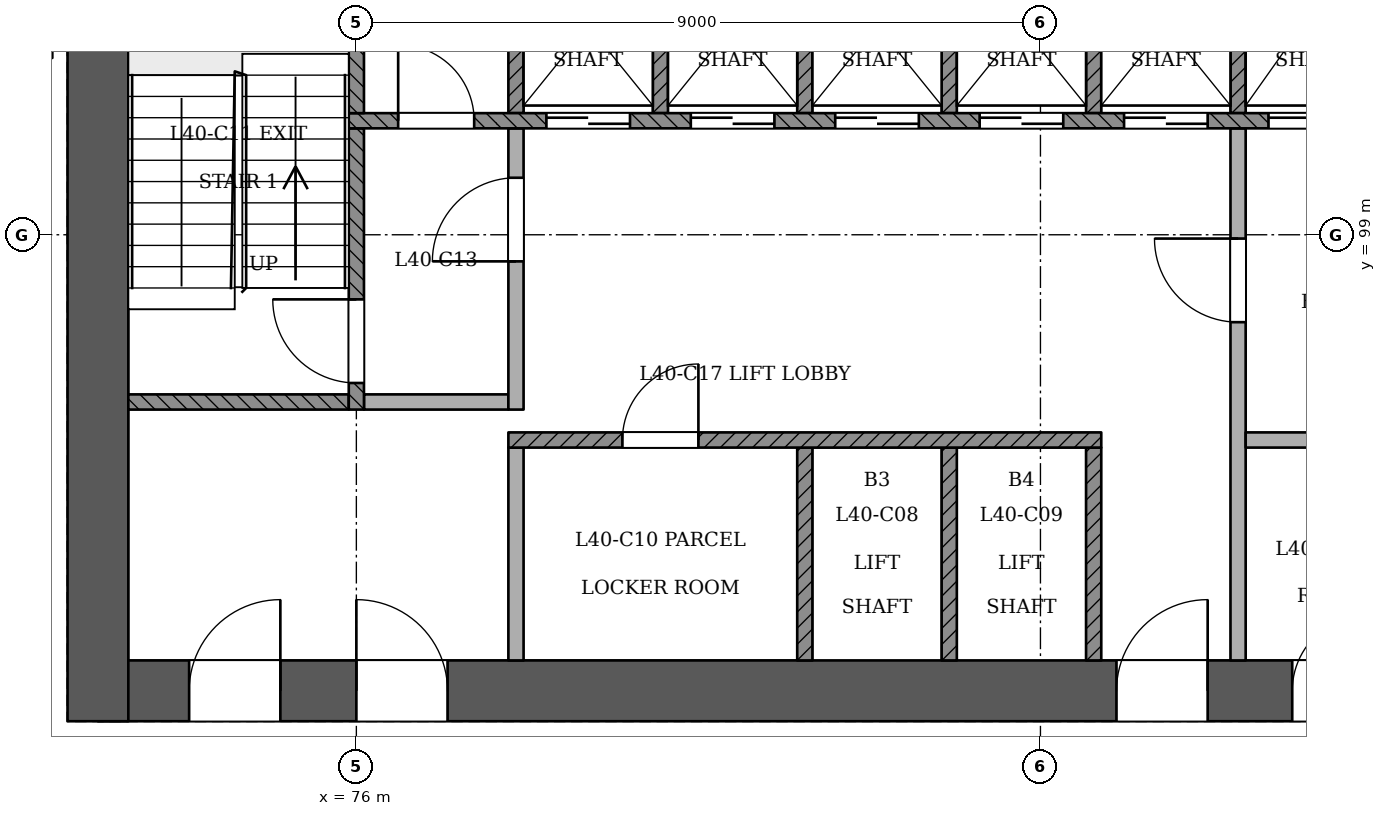
"""IFC4 building model, lengths in metres.
Left out: names, types, materials, properties, quantities, classifications, styles, units other than length and angle.
Written with IfcOpenShell. Run it as: python <this file> out.ifc"""

import sys

from ifc_helpers import new_model, si_unit, direction, frame, frame_2d, origin, place, context, subcontext, project, spatial, rectangle, extrude, element, fill, save


model = new_model("IFC4")
c1 = context("Model", 3, precision=1e-05, world=origin(), true_north=direction((0.0, 1.0)))
c2 = subcontext(c1, "Body", "Model", "MODEL_VIEW")
j1 = project(units=[si_unit("LENGTHUNIT", "METRE"), si_unit("PLANEANGLEUNIT", "RADIAN")], contexts=[c1])
p1 = place(None, origin())
s1 = spatial("IfcSite", under=j1, at=p1, CompositionType="ELEMENT")
p2 = place(p1, origin())
s2 = spatial("IfcBuilding", under=s1, at=p2, CompositionType="ELEMENT")
p3 = place(p2, frame((0.0, 0.0, 156.6)))
s3 = spatial("IfcBuildingStorey", under=s2, at=p3, CompositionType="ELEMENT", Elevation=156.6)
p4 = place(p3, frame((72.6, 93.0, 0.0), z_axis=(0.0, 0.0, 1.0), x_axis=(1.0, 0.0, 0.0)))
e1 = element("IfcWall", 1, at=p4, inside=s3, PredefinedType="SHEAR", context=c2, shape_type="SweptSolid", body=[
    extrude(rectangle(XDim=25.2, YDim=0.8, at=frame_2d((12.6, 0.0))), origin(), (0.0, 0.0, 1.0), 3.6),
])
p5 = place(p4, frame((1.2, 0.0, 0.0)))
e2 = element("IfcOpeningElement", 2, at=p5, cuts=e1, PredefinedType="OPENING", context=c2, shape_type="SweptSolid", body=[
    extrude(rectangle(XDim=1.2, YDim=2.1, at=frame_2d((0.6, 1.05))), frame((0.0, 0.411, 0.0), z_axis=(0.0, -1.0, 0.0), x_axis=(1.0, 0.0, 0.0)), (0.0, 0.0, 1.0), 0.821),
])
p6 = place(p4, frame((3.4, 0.0, 0.0)))
e3 = element("IfcOpeningElement", 3, at=p6, cuts=e1, PredefinedType="OPENING", context=c2, shape_type="SweptSolid", body=[
    extrude(rectangle(XDim=1.2, YDim=2.1, at=frame_2d((0.6, 1.05))), frame((0.0, 0.411, 0.0), z_axis=(0.0, -1.0, 0.0), x_axis=(1.0, 0.0, 0.0)), (0.0, 0.0, 1.0), 0.821),
])
p7 = place(p4, frame((13.4, 0.0, 0.0)))
e4 = element("IfcOpeningElement", 4, at=p7, cuts=e1, PredefinedType="OPENING", context=c2, shape_type="SweptSolid", body=[
    extrude(rectangle(XDim=1.2, YDim=2.1, at=frame_2d((0.6, 1.05))), frame((0.0, 0.411, 0.0), z_axis=(0.0, -1.0, 0.0), x_axis=(1.0, 0.0, 0.0)), (0.0, 0.0, 1.0), 0.821),
])
p8 = place(p4, frame((15.712, 0.0, 0.0)))
e5 = element("IfcOpeningElement", 5, at=p8, cuts=e1, PredefinedType="OPENING", context=c2, shape_type="SweptSolid", body=[
    extrude(rectangle(XDim=1.0, YDim=2.1, at=frame_2d((0.5, 1.05))), frame((0.0, 0.411, 0.0), z_axis=(0.0, -1.0, 0.0), x_axis=(1.0, 0.0, 0.0)), (0.0, 0.0, 1.0), 0.821),
])
p9 = place(p4, frame((19.15, 0.0, 0.0)))
e6 = element("IfcOpeningElement", 6, at=p9, cuts=e1, PredefinedType="OPENING", context=c2, shape_type="SweptSolid", body=[
    extrude(rectangle(XDim=1.0, YDim=2.1, at=frame_2d((0.5, 1.05))), frame((0.0, 0.411, 0.0), z_axis=(0.0, -1.0, 0.0), x_axis=(1.0, 0.0, 0.0)), (0.0, 0.0, 1.0), 0.821),
])
p10 = place(p4, frame((22.688, 0.0, 0.0)))
e7 = element("IfcOpeningElement", 7, at=p10, cuts=e1, PredefinedType="OPENING", context=c2, shape_type="SweptSolid", body=[
    extrude(rectangle(XDim=1.0, YDim=2.1, at=frame_2d((0.5, 1.05))), frame((0.0, 0.411, 0.0), z_axis=(0.0, -1.0, 0.0), x_axis=(1.0, 0.0, 0.0)), (0.0, 0.0, 1.0), 0.821),
])
p11 = place(p3, frame((72.6, 103.8, 0.0), z_axis=(0.0, 0.0, 1.0), x_axis=(0.0, -1.0, 0.0)))
e8 = element("IfcWall", 8, at=p11, inside=s3, PredefinedType="SHEAR", context=c2, shape_type="SweptSolid", body=[
    extrude(rectangle(XDim=11.2, YDim=0.8, at=frame_2d((5.6, 0.0))), origin(), (0.0, 0.0, 1.0), 3.6),
])
p12 = place(p3, frame((66.322, 97.326, 0.0), z_axis=(0.0, 0.0, 1.0), x_axis=(0.4999994764, -0.866025706085, 0.0)))
e9 = element("IfcWall", 9, at=p12, inside=s3, PredefinedType="PARTITIONING", context=c2, shape_type="SweptSolid", body=[
    extrude(rectangle(XDim=37.355, YDim=0.15, at=frame_2d((18.678, 0.0))), origin(), (0.0, 0.0, 1.0), 2.75),
])
p13 = place(p12, frame((2.8, 0.0, 0.0)))
e10 = element("IfcOpeningElement", 10, at=p13, cuts=e9, PredefinedType="OPENING", context=c2, shape_type="SweptSolid", body=[
    extrude(rectangle(XDim=1.2, YDim=2.1, at=frame_2d((0.6, 1.05))), frame((0.0, 0.085, 0.0), z_axis=(0.0, -1.0, 0.0), x_axis=(1.0, 0.0, 0.0)), (0.0, 0.0, 1.0), 0.171),
])
p14 = place(p12, frame((11.8, 0.0, 0.0)))
e11 = element("IfcOpeningElement", 11, at=p14, cuts=e9, PredefinedType="OPENING", context=c2, shape_type="SweptSolid", body=[
    extrude(rectangle(XDim=1.2, YDim=2.1, at=frame_2d((0.6, 1.05))), frame((0.0, 0.085, 0.0), z_axis=(0.0, -1.0, 0.0), x_axis=(1.0, 0.0, 0.0)), (0.0, 0.0, 1.0), 0.171),
])
p15 = place(p12, frame((24.15, 0.0, 0.0)))
e12 = element("IfcOpeningElement", 12, at=p15, cuts=e9, PredefinedType="OPENING", context=c2, shape_type="SweptSolid", body=[
    extrude(rectangle(XDim=1.2, YDim=2.1, at=frame_2d((0.6, 1.05))), frame((0.0, 0.085, 0.0), z_axis=(0.0, -1.0, 0.0), x_axis=(1.0, 0.0, 0.0)), (0.0, 0.0, 1.0), 0.171),
])
p16 = place(p12, frame((33.25, 0.0, 0.0)))
e13 = element("IfcOpeningElement", 13, at=p16, cuts=e9, PredefinedType="OPENING", context=c2, shape_type="SweptSolid", body=[
    extrude(rectangle(XDim=1.0, YDim=2.1, at=frame_2d((0.5, 1.05))), frame((0.0, 0.085, 0.0), z_axis=(0.0, -1.0, 0.0), x_axis=(1.0, 0.0, 0.0)), (0.0, 0.0, 1.0), 0.171),
])
p17 = place(p3, frame((85.065, 65.088, 0.0), z_axis=(0.0, 0.0, 1.0), x_axis=(0.500000254076, 0.866025257093, 0.0)))
e14 = element("IfcWall", 14, at=p17, inside=s3, PredefinedType="PARTITIONING", context=c2, shape_type="SweptSolid", body=[
    extrude(rectangle(XDim=37.226, YDim=0.15, at=frame_2d((18.613, 0.0))), origin(), (0.0, 0.0, 1.0), 2.75),
])
p18 = place(p17, frame((0.542, 0.0, 0.0)))
e15 = element("IfcOpeningElement", 15, at=p18, cuts=e14, PredefinedType="OPENING", context=c2, shape_type="SweptSolid", body=[
    extrude(rectangle(XDim=1.2, YDim=2.1, at=frame_2d((0.6, 1.05))), frame((0.0, 0.085, 0.0), z_axis=(0.0, -1.0, 0.0), x_axis=(1.0, 0.0, 0.0)), (0.0, 0.0, 1.0), 0.171),
])
p19 = place(p17, frame((11.876, 0.0, 0.0)))
e16 = element("IfcOpeningElement", 16, at=p19, cuts=e14, PredefinedType="OPENING", context=c2, shape_type="SweptSolid", body=[
    extrude(rectangle(XDim=1.2, YDim=2.1, at=frame_2d((0.6, 1.05))), frame((0.0, 0.085, 0.0), z_axis=(0.0, -1.0, 0.0), x_axis=(1.0, 0.0, 0.0)), (0.0, 0.0, 1.0), 0.171),
])
p20 = place(p17, frame((22.026, 0.0, 0.0)))
e17 = element("IfcOpeningElement", 17, at=p20, cuts=e14, PredefinedType="OPENING", context=c2, shape_type="SweptSolid", body=[
    extrude(rectangle(XDim=1.2, YDim=2.1, at=frame_2d((0.6, 1.05))), frame((0.0, 0.085, 0.0), z_axis=(0.0, -1.0, 0.0), x_axis=(1.0, 0.0, 0.0)), (0.0, 0.0, 1.0), 0.171),
])
p21 = place(p17, frame((31.026, 0.0, 0.0)))
e18 = element("IfcOpeningElement", 18, at=p21, cuts=e14, PredefinedType="OPENING", context=c2, shape_type="SweptSolid", body=[
    extrude(rectangle(XDim=1.2, YDim=2.1, at=frame_2d((0.6, 1.05))), frame((0.0, 0.085, 0.0), z_axis=(0.0, -1.0, 0.0), x_axis=(1.0, 0.0, 0.0)), (0.0, 0.0, 1.0), 0.171),
])
p22 = place(p3, frame((78.1, 93.4, 0.0), z_axis=(0.0, 0.0, 1.0), x_axis=(0.0, 1.0, 0.0)))
e19 = element("IfcWall", 19, at=p22, inside=s3, PredefinedType="PARTITIONING", context=c2, shape_type="SweptSolid", body=[
    extrude(rectangle(XDim=2.8, YDim=0.2, at=frame_2d((1.4, 0.0))), origin(), (0.0, 0.0, 1.0), 3.15),
])
for number, where, z_axis, x_axis in (
    (20, (81.9, 93.4, 0.0), (0.0, 0.0, 1.0), (0.0, 1.0, 0.0)),
    (21, (83.8, 93.4, 0.0), (0.0, 0.0, 1.0), (0.0, 1.0, 0.0)),
    (22, (85.7, 93.4, 0.0), (0.0, 0.0, 1.0), (0.0, 1.0, 0.0)),
):
    element("IfcWall", number, at=place(p3, frame(where, z_axis=z_axis, x_axis=x_axis)), inside=s3, PredefinedType="SOLIDWALL", context=c2, shape_type="SweptSolid", body=[
        extrude(rectangle(XDim=2.8, YDim=0.2, at=frame_2d((1.4, 0.0))), origin(), (0.0, 0.0, 1.0), 3.15),
    ])
p23 = place(p3, frame((87.6, 93.4, 0.0), z_axis=(0.0, 0.0, 1.0), x_axis=(0.0, 1.0, 0.0)))
e23 = element("IfcWall", 23, at=p23, inside=s3, PredefinedType="PARTITIONING", context=c2, shape_type="SweptSolid", body=[
    extrude(rectangle(XDim=7.0, YDim=0.2, at=frame_2d((3.5, 0.0))), origin(), (0.0, 0.0, 1.0), 3.15),
])
p24 = place(p23, frame((4.45, 0.0, 0.0)))
e24 = element("IfcOpeningElement", 24, at=p24, cuts=e23, PredefinedType="OPENING", context=c2, shape_type="SweptSolid", body=[
    extrude(rectangle(XDim=1.1, YDim=2.1, at=frame_2d((0.55, 1.05))), frame((0.0, 0.11, 0.0), z_axis=(0.0, -1.0, 0.0), x_axis=(1.0, 0.0, 0.0)), (0.0, 0.0, 1.0), 0.221),
])
p25 = place(p3, frame((78.0, 96.3, 0.0), z_axis=(0.0, 0.0, 1.0), x_axis=(1.0, 0.0, 0.0)))
e25 = element("IfcWall", 25, at=p25, inside=s3, PredefinedType="SOLIDWALL", context=c2, shape_type="SweptSolid", body=[
    extrude(rectangle(XDim=7.8, YDim=0.2, at=frame_2d((3.9, 0.0))), origin(), (0.0, 0.0, 1.0), 3.15),
])
p26 = place(p25, frame((1.5, 0.0, 0.0)))
e26 = element("IfcOpeningElement", 26, at=p26, cuts=e25, PredefinedType="OPENING", context=c2, shape_type="SweptSolid", body=[
    extrude(rectangle(XDim=1.0, YDim=2.1, at=frame_2d((0.5, 1.05))), frame((0.0, 0.11, 0.0), z_axis=(0.0, -1.0, 0.0), x_axis=(1.0, 0.0, 0.0)), (0.0, 0.0, 1.0), 0.221),
])
p27 = place(p3, frame((87.7, 96.3, 0.0), z_axis=(0.0, 0.0, 1.0), x_axis=(1.0, 0.0, 0.0)))
e27 = element("IfcWall", 27, at=p27, inside=s3, PredefinedType="PARTITIONING", context=c2, shape_type="SweptSolid", body=[
    extrude(rectangle(XDim=3.6, YDim=0.2, at=frame_2d((1.8, 0.0))), origin(), (0.0, 0.0, 1.0), 3.15),
])
p28 = place(p3, frame((73.0, 96.8, 0.0), z_axis=(0.0, 0.0, 1.0), x_axis=(1.0, 0.0, 0.0)))
e28 = element("IfcWall", 28, at=p28, inside=s3, PredefinedType="SOLIDWALL", context=c2, shape_type="SweptSolid", body=[
    extrude(rectangle(XDim=2.9, YDim=0.2, at=frame_2d((1.45, 0.0))), origin(), (0.0, 0.0, 1.0), 3.15),
])
p29 = place(p3, frame((76.0, 96.7, 0.0), z_axis=(0.0, 0.0, 1.0), x_axis=(0.0, 1.0, 0.0)))
e29 = element("IfcWall", 29, at=p29, inside=s3, PredefinedType="SOLIDWALL", context=c2, shape_type="SweptSolid", body=[
    extrude(rectangle(XDim=3.7, YDim=0.2, at=frame_2d((1.85, 0.0))), origin(), (0.0, 0.0, 1.0), 3.15),
])
p30 = place(p29, frame((0.35, 0.0, 0.0)))
e30 = element("IfcOpeningElement", 30, at=p30, cuts=e29, PredefinedType="OPENING", context=c2, shape_type="SweptSolid", body=[
    extrude(rectangle(XDim=1.1, YDim=2.1, at=frame_2d((0.55, 1.05))), frame((0.0, 0.11, 0.0), z_axis=(0.0, -1.0, 0.0), x_axis=(1.0, 0.0, 0.0)), (0.0, 0.0, 1.0), 0.221),
])
p31 = place(p3, frame((76.1, 96.8, 0.0), z_axis=(0.0, 0.0, 1.0), x_axis=(1.0, 0.0, 0.0)))
e31 = element("IfcWall", 31, at=p31, inside=s3, PredefinedType="PARTITIONING", context=c2, shape_type="SweptSolid", body=[
    extrude(rectangle(XDim=1.9, YDim=0.2, at=frame_2d((0.95, 0.0))), origin(), (0.0, 0.0, 1.0), 3.15),
])
p32 = place(p3, frame((78.1, 96.7, 0.0), z_axis=(0.0, 0.0, 1.0), x_axis=(0.0, 1.0, 0.0)))
e32 = element("IfcWall", 32, at=p32, inside=s3, PredefinedType="PARTITIONING", context=c2, shape_type="SweptSolid", body=[
    extrude(rectangle(XDim=3.7, YDim=0.2, at=frame_2d((1.85, 0.0))), origin(), (0.0, 0.0, 1.0), 3.15),
])
p33 = place(p32, frame((1.95, 0.0, 0.0)))
e33 = element("IfcOpeningElement", 33, at=p33, cuts=e32, PredefinedType="OPENING", context=c2, shape_type="SweptSolid", body=[
    extrude(rectangle(XDim=1.1, YDim=2.1, at=frame_2d((0.55, 1.05))), frame((0.0, 0.11, 0.0), z_axis=(0.0, -1.0, 0.0), x_axis=(1.0, 0.0, 0.0)), (0.0, 0.0, 1.0), 0.221),
])
p34 = place(p3, frame((75.9, 100.5, 0.0), z_axis=(0.0, 0.0, 1.0), x_axis=(1.0, 0.0, 0.0)))
e34 = element("IfcWall", 34, at=p34, inside=s3, PredefinedType="SOLIDWALL", context=c2, shape_type="SweptSolid", body=[
    extrude(rectangle(XDim=18.2, YDim=0.2, at=frame_2d((9.1, 0.0))), origin(), (0.0, 0.0, 1.0), 3.15),
])
p35 = place(p34, frame((2.6, 0.0, 0.0)))
e35 = element("IfcOpeningElement", 35, at=p35, cuts=e34, PredefinedType="OPENING", context=c2, shape_type="SweptSolid", body=[
    extrude(rectangle(XDim=1.1, YDim=2.1, at=frame_2d((0.55, 1.05))), frame((0.0, 0.11, 0.0), z_axis=(0.0, -1.0, 0.0), x_axis=(1.0, 0.0, 0.0)), (0.0, 0.0, 1.0), 0.221),
])
p36 = place(p34, frame((4.5, 0.0, 0.0)))
e36 = element("IfcOpeningElement", 36, at=p36, cuts=e34, PredefinedType="OPENING", context=c2, shape_type="SweptSolid", body=[
    extrude(rectangle(XDim=1.1, YDim=2.1, at=frame_2d((0.55, 1.05))), frame((0.0, 0.11, 0.0), z_axis=(0.0, -1.0, 0.0), x_axis=(1.0, 0.0, 0.0)), (0.0, 0.0, 1.0), 0.221),
])
p37 = place(p34, frame((6.4, 0.0, 0.0)))
e37 = element("IfcOpeningElement", 37, at=p37, cuts=e34, PredefinedType="OPENING", context=c2, shape_type="SweptSolid", body=[
    extrude(rectangle(XDim=1.1, YDim=2.1, at=frame_2d((0.55, 1.05))), frame((0.0, 0.11, 0.0), z_axis=(0.0, -1.0, 0.0), x_axis=(1.0, 0.0, 0.0)), (0.0, 0.0, 1.0), 0.221),
])
p38 = place(p34, frame((8.3, 0.0, 0.0)))
e38 = element("IfcOpeningElement", 38, at=p38, cuts=e34, PredefinedType="OPENING", context=c2, shape_type="SweptSolid", body=[
    extrude(rectangle(XDim=1.1, YDim=2.1, at=frame_2d((0.55, 1.05))), frame((0.0, 0.11, 0.0), z_axis=(0.0, -1.0, 0.0), x_axis=(1.0, 0.0, 0.0)), (0.0, 0.0, 1.0), 0.221),
])
p39 = place(p34, frame((10.2, 0.0, 0.0)))
e39 = element("IfcOpeningElement", 39, at=p39, cuts=e34, PredefinedType="OPENING", context=c2, shape_type="SweptSolid", body=[
    extrude(rectangle(XDim=1.1, YDim=2.1, at=frame_2d((0.55, 1.05))), frame((0.0, 0.11, 0.0), z_axis=(0.0, -1.0, 0.0), x_axis=(1.0, 0.0, 0.0)), (0.0, 0.0, 1.0), 0.221),
])
p40 = place(p34, frame((12.1, 0.0, 0.0)))
e40 = element("IfcOpeningElement", 40, at=p40, cuts=e34, PredefinedType="OPENING", context=c2, shape_type="SweptSolid", body=[
    extrude(rectangle(XDim=1.1, YDim=2.1, at=frame_2d((0.55, 1.05))), frame((0.0, 0.11, 0.0), z_axis=(0.0, -1.0, 0.0), x_axis=(1.0, 0.0, 0.0)), (0.0, 0.0, 1.0), 0.221),
])
p41 = place(p34, frame((14.0, 0.0, 0.0)))
e41 = element("IfcOpeningElement", 41, at=p41, cuts=e34, PredefinedType="OPENING", context=c2, shape_type="SweptSolid", body=[
    extrude(rectangle(XDim=1.1, YDim=2.1, at=frame_2d((0.55, 1.05))), frame((0.0, 0.11, 0.0), z_axis=(0.0, -1.0, 0.0), x_axis=(1.0, 0.0, 0.0)), (0.0, 0.0, 1.0), 0.221),
])
p42 = place(p34, frame((0.65, 0.0, 0.0)))
e42 = element("IfcOpeningElement", 42, at=p42, cuts=e34, PredefinedType="OPENING", context=c2, shape_type="SweptSolid", body=[
    extrude(rectangle(XDim=1.0, YDim=2.1, at=frame_2d((0.5, 1.05))), frame((0.0, 0.11, 0.0), z_axis=(0.0, -1.0, 0.0), x_axis=(1.0, 0.0, 0.0)), (0.0, 0.0, 1.0), 0.221),
])
p43 = place(p34, frame((16.3, 0.0, 0.0)))
e43 = element("IfcOpeningElement", 43, at=p43, cuts=e34, PredefinedType="OPENING", context=c2, shape_type="SweptSolid", body=[
    extrude(rectangle(XDim=1.0, YDim=2.1, at=frame_2d((0.5, 1.05))), frame((0.0, 0.11, 0.0), z_axis=(0.0, -1.0, 0.0), x_axis=(1.0, 0.0, 0.0)), (0.0, 0.0, 1.0), 0.221),
])
for number, where, z_axis, x_axis in (
    (44, (76.0, 100.6, 0.0), (0.0, 0.0, 1.0), (0.0, 1.0, 0.0)),
    (45, (78.1, 100.6, 0.0), (0.0, 0.0, 1.0), (0.0, 1.0, 0.0)),
    (46, (80.0, 100.6, 0.0), (0.0, 0.0, 1.0), (0.0, 1.0, 0.0)),
    (47, (81.9, 100.6, 0.0), (0.0, 0.0, 1.0), (0.0, 1.0, 0.0)),
    (48, (83.8, 100.6, 0.0), (0.0, 0.0, 1.0), (0.0, 1.0, 0.0)),
    (49, (85.7, 100.6, 0.0), (0.0, 0.0, 1.0), (0.0, 1.0, 0.0)),
    (50, (87.6, 100.6, 0.0), (0.0, 0.0, 1.0), (0.0, 1.0, 0.0)),
):
    element("IfcWall", number, at=place(p3, frame(where, z_axis=z_axis, x_axis=x_axis)), inside=s3, PredefinedType="SOLIDWALL", context=c2, shape_type="SweptSolid", body=[
        extrude(rectangle(XDim=2.8, YDim=0.2, at=frame_2d((1.4, 0.0))), origin(), (0.0, 0.0, 1.0), 3.15),
    ])
p44 = place(p35, origin())
e51 = element("IfcDoor", 51, at=p44, inside=s3, OperationType="SLIDING_TO_RIGHT", PredefinedType="NOTDEFINED", context=c2, shape_type="SweptSolid", body=[
    extrude(rectangle(XDim=1.1, YDim=2.1, at=frame_2d((0.55, 1.05))), frame((0.0, 0.025, 0.0), z_axis=(0.0, -1.0, 0.0), x_axis=(1.0, 0.0, 0.0)), (0.0, 0.0, 1.0), 0.05),
])
fill(e35, e51)
p45 = place(p36, origin())
e52 = element("IfcDoor", 52, at=p45, inside=s3, OperationType="SLIDING_TO_LEFT", PredefinedType="NOTDEFINED", context=c2, shape_type="SweptSolid", body=[
    extrude(rectangle(XDim=1.1, YDim=2.1, at=frame_2d((0.55, 1.05))), frame((0.0, 0.025, 0.0), z_axis=(0.0, -1.0, 0.0), x_axis=(1.0, 0.0, 0.0)), (0.0, 0.0, 1.0), 0.05),
])
fill(e36, e52)
p46 = place(p37, origin())
e53 = element("IfcDoor", 53, at=p46, inside=s3, OperationType="SLIDING_TO_RIGHT", PredefinedType="NOTDEFINED", context=c2, shape_type="SweptSolid", body=[
    extrude(rectangle(XDim=1.1, YDim=2.1, at=frame_2d((0.55, 1.05))), frame((0.0, 0.025, 0.0), z_axis=(0.0, -1.0, 0.0), x_axis=(1.0, 0.0, 0.0)), (0.0, 0.0, 1.0), 0.05),
])
fill(e37, e53)
p47 = place(p38, origin())
e54 = element("IfcDoor", 54, at=p47, inside=s3, OperationType="SLIDING_TO_LEFT", PredefinedType="NOTDEFINED", context=c2, shape_type="SweptSolid", body=[
    extrude(rectangle(XDim=1.1, YDim=2.1, at=frame_2d((0.55, 1.05))), frame((0.0, 0.025, 0.0), z_axis=(0.0, -1.0, 0.0), x_axis=(1.0, 0.0, 0.0)), (0.0, 0.0, 1.0), 0.05),
])
fill(e38, e54)
p48 = place(p39, origin())
e55 = element("IfcDoor", 55, at=p48, inside=s3, OperationType="SLIDING_TO_RIGHT", PredefinedType="NOTDEFINED", context=c2, shape_type="SweptSolid", body=[
    extrude(rectangle(XDim=1.1, YDim=2.1, at=frame_2d((0.55, 1.05))), frame((0.0, 0.025, 0.0), z_axis=(0.0, -1.0, 0.0), x_axis=(1.0, 0.0, 0.0)), (0.0, 0.0, 1.0), 0.05),
])
fill(e39, e55)
p49 = place(p40, origin())
e56 = element("IfcDoor", 56, at=p49, inside=s3, OperationType="SLIDING_TO_RIGHT", PredefinedType="NOTDEFINED", context=c2, shape_type="SweptSolid", body=[
    extrude(rectangle(XDim=1.1, YDim=2.1, at=frame_2d((0.55, 1.05))), frame((0.0, 0.025, 0.0), z_axis=(0.0, -1.0, 0.0), x_axis=(1.0, 0.0, 0.0)), (0.0, 0.0, 1.0), 0.05),
])
fill(e40, e56)
p50 = place(p30, origin())
e57 = element("IfcDoor", 57, at=p50, inside=s3, OperationType="SINGLE_SWING_RIGHT", PredefinedType="NOTDEFINED", context=c2, shape_type="SweptSolid", body=[
    extrude(rectangle(XDim=1.1, YDim=2.1, at=frame_2d((0.55, 1.05))), frame((0.0, 0.025, 0.0), z_axis=(0.0, -1.0, 0.0), x_axis=(1.0, 0.0, 0.0)), (0.0, 0.0, 1.0), 0.05),
])
fill(e30, e57)
p51 = place(p33, origin())
e58 = element("IfcDoor", 58, at=p51, inside=s3, OperationType="SINGLE_SWING_LEFT", PredefinedType="NOTDEFINED", context=c2, shape_type="SweptSolid", body=[
    extrude(rectangle(XDim=1.1, YDim=2.1, at=frame_2d((0.55, 1.05))), frame((0.0, 0.025, 0.0), z_axis=(0.0, -1.0, 0.0), x_axis=(1.0, 0.0, 0.0)), (0.0, 0.0, 1.0), 0.05),
])
fill(e33, e58)
p52 = place(p24, origin())
e59 = element("IfcDoor", 59, at=p52, inside=s3, OperationType="SINGLE_SWING_RIGHT", PredefinedType="NOTDEFINED", context=c2, shape_type="SweptSolid", body=[
    extrude(rectangle(XDim=1.1, YDim=2.1, at=frame_2d((0.55, 1.05))), frame((0.0, 0.025, 0.0), z_axis=(0.0, -1.0, 0.0), x_axis=(1.0, 0.0, 0.0)), (0.0, 0.0, 1.0), 0.05),
])
fill(e24, e59)
p53 = place(p5, origin())
e60 = element("IfcDoor", 60, at=p53, inside=s3, OperationType="SINGLE_SWING_RIGHT", PredefinedType="NOTDEFINED", context=c2, shape_type="SweptSolid", body=[
    extrude(rectangle(XDim=1.2, YDim=2.1, at=frame_2d((0.6, 1.05))), frame((0.0, 0.025, 0.0), z_axis=(0.0, -1.0, 0.0), x_axis=(1.0, 0.0, 0.0)), (0.0, 0.0, 1.0), 0.05),
])
fill(e2, e60)
p54 = place(p6, origin())
e61 = element("IfcDoor", 61, at=p54, inside=s3, OperationType="SINGLE_SWING_LEFT", PredefinedType="NOTDEFINED", context=c2, shape_type="SweptSolid", body=[
    extrude(rectangle(XDim=1.2, YDim=2.1, at=frame_2d((0.6, 1.05))), frame((0.0, 0.025, 0.0), z_axis=(0.0, -1.0, 0.0), x_axis=(1.0, 0.0, 0.0)), (0.0, 0.0, 1.0), 0.05),
])
fill(e3, e61)
p55 = place(p7, origin())
e62 = element("IfcDoor", 62, at=p55, inside=s3, OperationType="SINGLE_SWING_RIGHT", PredefinedType="NOTDEFINED", context=c2, shape_type="SweptSolid", body=[
    extrude(rectangle(XDim=1.2, YDim=2.1, at=frame_2d((0.6, 1.05))), frame((0.0, 0.025, 0.0), z_axis=(0.0, -1.0, 0.0), x_axis=(1.0, 0.0, 0.0)), (0.0, 0.0, 1.0), 0.05),
])
fill(e4, e62)
p56 = place(p42, origin())
e63 = element("IfcDoor", 63, at=p56, inside=s3, OperationType="SINGLE_SWING_LEFT", PredefinedType="NOTDEFINED", context=c2, shape_type="SweptSolid", body=[
    extrude(rectangle(XDim=1.0, YDim=2.1, at=frame_2d((0.5, 1.05))), frame((0.0, 0.025, 0.0), z_axis=(0.0, -1.0, 0.0), x_axis=(1.0, 0.0, 0.0)), (0.0, 0.0, 1.0), 0.05),
])
fill(e42, e63)
p57 = place(p8, origin())
e64 = element("IfcDoor", 64, at=p57, inside=s3, OperationType="SINGLE_SWING_RIGHT", PredefinedType="NOTDEFINED", context=c2, shape_type="SweptSolid", body=[
    extrude(rectangle(XDim=1.0, YDim=2.1, at=frame_2d((0.5, 1.05))), frame((0.0, 0.025, 0.0), z_axis=(0.0, -1.0, 0.0), x_axis=(1.0, 0.0, 0.0)), (0.0, 0.0, 1.0), 0.05),
])
fill(e5, e64)
p58 = place(p26, origin())
e65 = element("IfcDoor", 65, at=p58, inside=s3, OperationType="SINGLE_SWING_RIGHT", PredefinedType="NOTDEFINED", context=c2, shape_type="SweptSolid", body=[
    extrude(rectangle(XDim=1.0, YDim=2.1, at=frame_2d((0.5, 1.05))), frame((0.0, 0.025, 0.0), z_axis=(0.0, -1.0, 0.0), x_axis=(1.0, 0.0, 0.0)), (0.0, 0.0, 1.0), 0.05),
])
fill(e26, e65)
save(model, sys.argv[1])
